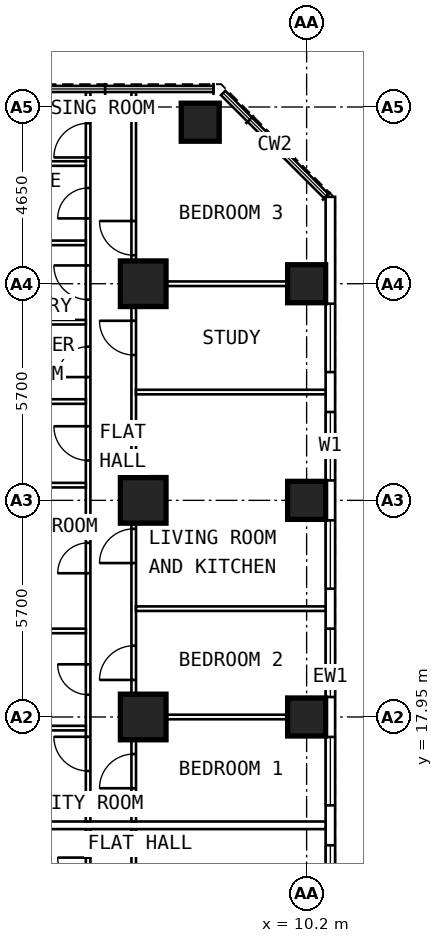
"""IFC4 building model, lengths in metres.
Left out: names, types, materials, properties, quantities, classifications, styles, units other than length and angle.
Written with IfcOpenShell. Run it as: python <this file> out.ifc"""

import sys

from ifc_helpers import new_model, si_unit, direction, frame, frame_2d, origin, origin_2d, place, context, subcontext, project, spatial, rectangle, extrude, element, fill, save


model = new_model("IFC4")
c1 = context("Model", 3, precision=1e-05, world=origin(), true_north=direction((0.0, 1.0)))
c2 = subcontext(c1, "Body", "Model", "MODEL_VIEW")
j1 = project(units=[si_unit("LENGTHUNIT", "METRE"), si_unit("PLANEANGLEUNIT", "RADIAN")], contexts=[c1])
p1 = place(None, origin())
s1 = spatial("IfcSite", under=j1, at=p1, CompositionType="ELEMENT")
p2 = place(p1, origin())
s2 = spatial("IfcBuilding", under=s1, at=p2, CompositionType="ELEMENT")
p3 = place(p2, frame((0.0, 0.0, 64.6)))
s3 = spatial("IfcBuildingStorey", under=s2, at=p3, CompositionType="ELEMENT", Elevation=64.6)
for number, where, z_axis, x_axis in (
    (1, (10.2, 17.95, 0.0), (0.0, 0.0, 1.0), (0.0, 1.0, 0.0)),
    (2, (10.2, 23.65, 0.0), (0.0, 0.0, 1.0), (0.0, 1.0, 0.0)),
    (3, (10.2, 29.35, 0.0), (0.0, 0.0, 1.0), (0.0, 1.0, 0.0)),
    (4, (7.4, 33.6, 0.0), (0.0, 0.0, 1.0), (0.0, 1.0, 0.0)),
):
    element("IfcColumn", number, at=place(p3, frame(where, z_axis=z_axis, x_axis=x_axis)), inside=s3, PredefinedType="COLUMN", context=c2, shape_type="SweptSolid", body=[
        extrude(rectangle(XDim=1.0, YDim=1.0, at=origin_2d()), origin(), (0.0, 0.0, 1.0), 3.6),
    ])
for number, where, z_axis, x_axis in (
    (5, (5.9, 17.95, 0.0), (0.0, 0.0, 1.0), (0.0, 1.0, 0.0)),
    (6, (5.9, 23.65, 0.0), (0.0, 0.0, 1.0), (0.0, 1.0, 0.0)),
    (7, (5.9, 29.35, 0.0), (0.0, 0.0, 1.0), (0.0, 1.0, 0.0)),
):
    element("IfcColumn", number, at=place(p3, frame(where, z_axis=z_axis, x_axis=x_axis)), inside=s3, PredefinedType="COLUMN", context=c2, shape_type="SweptSolid", body=[
        extrude(rectangle(XDim=1.2, YDim=1.2, at=origin_2d()), origin(), (0.0, 0.0, 1.0), 3.6),
    ])
p4 = place(p3, frame((10.825, 6.394, 0.0), z_axis=(0.0, 0.0, 1.0), x_axis=(0.0, 1.0, 0.0)))
e8 = element("IfcWall", 8, at=p4, inside=s3, PredefinedType="SOLIDWALL", context=c2, shape_type="SweptSolid", body=[
    extrude(rectangle(XDim=25.241, YDim=0.25, at=frame_2d((12.621, 0.0))), origin(), (0.0, 0.0, 1.0), 3.35),
])
p5 = place(p4, frame((0.681, 0.0, 0.8)))
e9 = element("IfcOpeningElement", 9, at=p5, cuts=e8, PredefinedType="OPENING", context=c2, shape_type="SweptSolid", body=[
    extrude(rectangle(XDim=1.8, YDim=1.8, at=frame_2d((0.9, 0.9))), frame((0.0, 0.137, 0.0), z_axis=(0.0, -1.0, 0.0), x_axis=(1.0, 0.0, 0.0)), (0.0, 0.0, 1.0), 0.274),
])
p6 = place(p4, frame((3.531, 0.0, 0.8)))
e10 = element("IfcOpeningElement", 10, at=p6, cuts=e8, PredefinedType="OPENING", context=c2, shape_type="SweptSolid", body=[
    extrude(rectangle(XDim=1.8, YDim=1.8, at=frame_2d((0.9, 0.9))), frame((0.0, 0.137, 0.0), z_axis=(0.0, -1.0, 0.0), x_axis=(1.0, 0.0, 0.0)), (0.0, 0.0, 1.0), 0.274),
])
p7 = place(p4, frame((6.381, 0.0, 0.8)))
e11 = element("IfcOpeningElement", 11, at=p7, cuts=e8, PredefinedType="OPENING", context=c2, shape_type="SweptSolid", body=[
    extrude(rectangle(XDim=1.8, YDim=1.8, at=frame_2d((0.9, 0.9))), frame((0.0, 0.137, 0.0), z_axis=(0.0, -1.0, 0.0), x_axis=(1.0, 0.0, 0.0)), (0.0, 0.0, 1.0), 0.274),
])
p8 = place(p4, frame((9.231, 0.0, 0.8)))
e12 = element("IfcOpeningElement", 12, at=p8, cuts=e8, PredefinedType="OPENING", context=c2, shape_type="SweptSolid", body=[
    extrude(rectangle(XDim=1.8, YDim=1.8, at=frame_2d((0.9, 0.9))), frame((0.0, 0.137, 0.0), z_axis=(0.0, -1.0, 0.0), x_axis=(1.0, 0.0, 0.0)), (0.0, 0.0, 1.0), 0.274),
])
p9 = place(p4, frame((12.081, 0.0, 0.8)))
e13 = element("IfcOpeningElement", 13, at=p9, cuts=e8, PredefinedType="OPENING", context=c2, shape_type="SweptSolid", body=[
    extrude(rectangle(XDim=1.8, YDim=1.8, at=frame_2d((0.9, 0.9))), frame((0.0, 0.137, 0.0), z_axis=(0.0, -1.0, 0.0), x_axis=(1.0, 0.0, 0.0)), (0.0, 0.0, 1.0), 0.274),
])
p10 = place(p4, frame((14.931, 0.0, 0.8)))
e14 = element("IfcOpeningElement", 14, at=p10, cuts=e8, PredefinedType="OPENING", context=c2, shape_type="SweptSolid", body=[
    extrude(rectangle(XDim=1.8, YDim=1.8, at=frame_2d((0.9, 0.9))), frame((0.0, 0.137, 0.0), z_axis=(0.0, -1.0, 0.0), x_axis=(1.0, 0.0, 0.0)), (0.0, 0.0, 1.0), 0.274),
])
p11 = place(p4, frame((17.781, 0.0, 0.8)))
e15 = element("IfcOpeningElement", 15, at=p11, cuts=e8, PredefinedType="OPENING", context=c2, shape_type="SweptSolid", body=[
    extrude(rectangle(XDim=1.8, YDim=1.8, at=frame_2d((0.9, 0.9))), frame((0.0, 0.137, 0.0), z_axis=(0.0, -1.0, 0.0), x_axis=(1.0, 0.0, 0.0)), (0.0, 0.0, 1.0), 0.274),
])
p12 = place(p4, frame((20.631, 0.0, 0.8)))
e16 = element("IfcOpeningElement", 16, at=p12, cuts=e8, PredefinedType="OPENING", context=c2, shape_type="SweptSolid", body=[
    extrude(rectangle(XDim=1.8, YDim=1.8, at=frame_2d((0.9, 0.9))), frame((0.0, 0.137, 0.0), z_axis=(0.0, -1.0, 0.0), x_axis=(1.0, 0.0, 0.0)), (0.0, 0.0, 1.0), 0.274),
])
p13 = place(p3, frame((4.45, 10.1, 0.0), z_axis=(0.0, 0.0, 1.0), x_axis=(0.0, 1.0, 0.0)))
e17 = element("IfcWall", 17, at=p13, inside=s3, PredefinedType="PARTITIONING", context=c2, shape_type="SweptSolid", body=[
    extrude(rectangle(XDim=4.9, YDim=0.12, at=frame_2d((2.45, 0.0))), origin(), (0.0, 0.0, 1.0), 3.35),
])
p14 = place(p13, frame((0.75, 0.0, 0.0)))
e18 = element("IfcOpeningElement", 18, at=p14, cuts=e17, PredefinedType="OPENING", context=c2, shape_type="SweptSolid", body=[
    extrude(rectangle(XDim=0.9, YDim=2.1, at=frame_2d((0.45, 1.05))), frame((0.0, 0.072, 0.0), z_axis=(0.0, -1.0, 0.0), x_axis=(1.0, 0.0, 0.0)), (0.0, 0.0, 1.0), 0.144),
])
p15 = place(p13, frame((3.35, 0.0, 0.0)))
e19 = element("IfcOpeningElement", 19, at=p15, cuts=e17, PredefinedType="OPENING", context=c2, shape_type="SweptSolid", body=[
    extrude(rectangle(XDim=0.8, YDim=2.1, at=frame_2d((0.4, 1.05))), frame((0.0, 0.072, 0.0), z_axis=(0.0, -1.0, 0.0), x_axis=(1.0, 0.0, 0.0)), (0.0, 0.0, 1.0), 0.144),
])
p16 = place(p3, frame((5.65, 9.6, 0.0), z_axis=(0.0, 0.0, 1.0), x_axis=(0.0, 1.0, 0.0)))
e20 = element("IfcWall", 20, at=p16, inside=s3, PredefinedType="PARTITIONING", context=c2, shape_type="SweptSolid", body=[
    extrude(rectangle(XDim=5.4, YDim=0.12, at=frame_2d((2.7, 0.0))), origin(), (0.0, 0.0, 1.0), 3.35),
])
p17 = place(p16, frame((3.4, 0.0, 0.0)))
e21 = element("IfcOpeningElement", 21, at=p17, cuts=e20, PredefinedType="OPENING", context=c2, shape_type="SweptSolid", body=[
    extrude(rectangle(XDim=0.9, YDim=2.1, at=frame_2d((0.45, 1.05))), frame((0.0, 0.072, 0.0), z_axis=(0.0, -1.0, 0.0), x_axis=(1.0, 0.0, 0.0)), (0.0, 0.0, 1.0), 0.144),
])
p18 = place(p3, frame((4.45, 15.2, 0.0), z_axis=(0.0, 0.0, 1.0), x_axis=(0.0, 1.0, 0.0)))
e22 = element("IfcWall", 22, at=p18, inside=s3, PredefinedType="PARTITIONING", context=c2, shape_type="SweptSolid", body=[
    extrude(rectangle(XDim=19.195, YDim=0.12, at=frame_2d((9.598, 0.0))), origin(), (0.0, 0.0, 1.0), 3.35),
])
p19 = place(p18, frame((1.329, 0.0, 0.0)))
e23 = element("IfcOpeningElement", 23, at=p19, cuts=e22, PredefinedType="OPENING", context=c2, shape_type="SweptSolid", body=[
    extrude(rectangle(XDim=0.9, YDim=2.1, at=frame_2d((0.45, 1.05))), frame((0.0, 0.072, 0.0), z_axis=(0.0, -1.0, 0.0), x_axis=(1.0, 0.0, 0.0)), (0.0, 0.0, 1.0), 0.144),
])
p20 = place(p18, frame((3.336, 0.0, 0.0)))
e24 = element("IfcOpeningElement", 24, at=p20, cuts=e22, PredefinedType="OPENING", context=c2, shape_type="SweptSolid", body=[
    extrude(rectangle(XDim=0.8, YDim=2.1, at=frame_2d((0.4, 1.05))), frame((0.0, 0.072, 0.0), z_axis=(0.0, -1.0, 0.0), x_axis=(1.0, 0.0, 0.0)), (0.0, 0.0, 1.0), 0.144),
])
p21 = place(p18, frame((6.532, 0.0, 0.0)))
e25 = element("IfcOpeningElement", 25, at=p21, cuts=e22, PredefinedType="OPENING", context=c2, shape_type="SweptSolid", body=[
    extrude(rectangle(XDim=0.8, YDim=2.1, at=frame_2d((0.4, 1.05))), frame((0.0, 0.072, 0.0), z_axis=(0.0, -1.0, 0.0), x_axis=(1.0, 0.0, 0.0)), (0.0, 0.0, 1.0), 0.144),
])
p22 = place(p18, frame((9.5, 0.0, 0.0)))
e26 = element("IfcOpeningElement", 26, at=p22, cuts=e22, PredefinedType="OPENING", context=c2, shape_type="SweptSolid", body=[
    extrude(rectangle(XDim=0.9, YDim=2.1, at=frame_2d((0.45, 1.05))), frame((0.0, 0.072, 0.0), z_axis=(0.0, -1.0, 0.0), x_axis=(1.0, 0.0, 0.0)), (0.0, 0.0, 1.0), 0.144),
])
p23 = place(p18, frame((11.694, 0.0, 0.0)))
e27 = element("IfcOpeningElement", 27, at=p23, cuts=e22, PredefinedType="OPENING", context=c2, shape_type="SweptSolid", body=[
    extrude(rectangle(XDim=0.8, YDim=2.1, at=frame_2d((0.4, 1.05))), frame((0.0, 0.072, 0.0), z_axis=(0.0, -1.0, 0.0), x_axis=(1.0, 0.0, 0.0)), (0.0, 0.0, 1.0), 0.144),
])
p24 = place(p18, frame((13.731, 0.0, 0.0)))
e28 = element("IfcOpeningElement", 28, at=p24, cuts=e22, PredefinedType="OPENING", context=c2, shape_type="SweptSolid", body=[
    extrude(rectangle(XDim=0.9, YDim=2.1, at=frame_2d((0.45, 1.05))), frame((0.0, 0.072, 0.0), z_axis=(0.0, -1.0, 0.0), x_axis=(1.0, 0.0, 0.0)), (0.0, 0.0, 1.0), 0.144),
])
p25 = place(p18, frame((15.869, 0.0, 0.0)))
e29 = element("IfcOpeningElement", 29, at=p25, cuts=e22, PredefinedType="OPENING", context=c2, shape_type="SweptSolid", body=[
    extrude(rectangle(XDim=0.8, YDim=2.1, at=frame_2d((0.4, 1.05))), frame((0.0, 0.072, 0.0), z_axis=(0.0, -1.0, 0.0), x_axis=(1.0, 0.0, 0.0)), (0.0, 0.0, 1.0), 0.144),
])
p26 = place(p18, frame((17.472, 0.0, 0.0)))
e30 = element("IfcOpeningElement", 30, at=p26, cuts=e22, PredefinedType="OPENING", context=c2, shape_type="SweptSolid", body=[
    extrude(rectangle(XDim=0.9, YDim=2.1, at=frame_2d((0.45, 1.05))), frame((0.0, 0.072, 0.0), z_axis=(0.0, -1.0, 0.0), x_axis=(1.0, 0.0, 0.0)), (0.0, 0.0, 1.0), 0.144),
])
p27 = place(p3, frame((5.65, 15.2, 0.0), z_axis=(0.0, 0.0, 1.0), x_axis=(0.0, 1.0, 0.0)))
e31 = element("IfcWall", 31, at=p27, inside=s3, PredefinedType="PARTITIONING", context=c2, shape_type="SweptSolid", body=[
    extrude(rectangle(XDim=19.195, YDim=0.12, at=frame_2d((9.598, 0.0))), origin(), (0.0, 0.0, 1.0), 3.35),
])
p28 = place(p27, frame((0.875, 0.0, 0.0)))
e32 = element("IfcOpeningElement", 32, at=p28, cuts=e31, PredefinedType="OPENING", context=c2, shape_type="SweptSolid", body=[
    extrude(rectangle(XDim=0.9, YDim=2.1, at=frame_2d((0.45, 1.05))), frame((0.0, 0.072, 0.0), z_axis=(0.0, -1.0, 0.0), x_axis=(1.0, 0.0, 0.0)), (0.0, 0.0, 1.0), 0.144),
])
p29 = place(p27, frame((3.725, 0.0, 0.0)))
e33 = element("IfcOpeningElement", 33, at=p29, cuts=e31, PredefinedType="OPENING", context=c2, shape_type="SweptSolid", body=[
    extrude(rectangle(XDim=0.9, YDim=2.1, at=frame_2d((0.45, 1.05))), frame((0.0, 0.072, 0.0), z_axis=(0.0, -1.0, 0.0), x_axis=(1.0, 0.0, 0.0)), (0.0, 0.0, 1.0), 0.144),
])
p30 = place(p27, frame((6.8, 0.0, 0.0)))
e34 = element("IfcOpeningElement", 34, at=p30, cuts=e31, PredefinedType="OPENING", context=c2, shape_type="SweptSolid", body=[
    extrude(rectangle(XDim=0.9, YDim=2.1, at=frame_2d((0.45, 1.05))), frame((0.0, 0.072, 0.0), z_axis=(0.0, -1.0, 0.0), x_axis=(1.0, 0.0, 0.0)), (0.0, 0.0, 1.0), 0.144),
])
p31 = place(p27, frame((12.275, 0.0, 0.0)))
e35 = element("IfcOpeningElement", 35, at=p31, cuts=e31, PredefinedType="OPENING", context=c2, shape_type="SweptSolid", body=[
    extrude(rectangle(XDim=0.9, YDim=2.1, at=frame_2d((0.45, 1.05))), frame((0.0, 0.072, 0.0), z_axis=(0.0, -1.0, 0.0), x_axis=(1.0, 0.0, 0.0)), (0.0, 0.0, 1.0), 0.144),
])
p32 = place(p27, frame((14.9, 0.0, 0.0)))
e36 = element("IfcOpeningElement", 36, at=p32, cuts=e31, PredefinedType="OPENING", context=c2, shape_type="SweptSolid", body=[
    extrude(rectangle(XDim=0.9, YDim=2.1, at=frame_2d((0.45, 1.05))), frame((0.0, 0.072, 0.0), z_axis=(0.0, -1.0, 0.0), x_axis=(1.0, 0.0, 0.0)), (0.0, 0.0, 1.0), 0.144),
])
p33 = place(p3, frame((5.71, 17.95, 0.0), z_axis=(0.0, 0.0, 1.0), x_axis=(1.0, 0.0, 0.0)))
e37 = element("IfcWall", 37, at=p33, inside=s3, PredefinedType="PARTITIONING", context=c2, shape_type="SweptSolid", body=[
    extrude(rectangle(XDim=4.99, YDim=0.12, at=frame_2d((2.495, 0.0))), origin(), (0.0, 0.0, 1.0), 2.45),
])
for number, where, z_axis, x_axis in (
    (38, (5.71, 20.8, 0.0), (0.0, 0.0, 1.0), (1.0, 0.0, 0.0)),
    (39, (5.71, 26.5, 0.0), (0.0, 0.0, 1.0), (1.0, 0.0, 0.0)),
):
    element("IfcWall", number, at=place(p3, frame(where, z_axis=z_axis, x_axis=x_axis)), inside=s3, PredefinedType="PARTITIONING", context=c2, shape_type="SweptSolid", body=[
        extrude(rectangle(XDim=4.99, YDim=0.12, at=frame_2d((2.495, 0.0))), origin(), (0.0, 0.0, 1.0), 3.35),
    ])
p34 = place(p3, frame((5.71, 29.35, 0.0), z_axis=(0.0, 0.0, 1.0), x_axis=(1.0, 0.0, 0.0)))
e40 = element("IfcWall", 40, at=p34, inside=s3, PredefinedType="PARTITIONING", context=c2, shape_type="SweptSolid", body=[
    extrude(rectangle(XDim=4.99, YDim=0.12, at=frame_2d((2.495, 0.0))), origin(), (0.0, 0.0, 1.0), 2.45),
])
p35 = place(p3, frame((2.1, 17.657, 0.0), z_axis=(0.0, 0.0, 1.0), x_axis=(1.0, 0.0, 0.0)))
e41 = element("IfcWall", 41, at=p35, inside=s3, PredefinedType="PARTITIONING", context=c2, shape_type="SweptSolid", body=[
    extrude(rectangle(XDim=2.29, YDim=0.12, at=frame_2d((1.145, 0.0))), origin(), (0.0, 0.0, 1.0), 2.45),
])
for number, where, z_axis, x_axis in (
    (42, (2.1, 20.214, 0.0), (0.0, 0.0, 1.0), (1.0, 0.0, 0.0)),
    (43, (2.1, 24.05, 0.0), (0.0, 0.0, 1.0), (1.0, 0.0, 0.0)),
    (44, (2.1, 26.25, 0.0), (0.0, 0.0, 1.0), (1.0, 0.0, 0.0)),
    (45, (2.1, 28.337, 0.0), (0.0, 0.0, 1.0), (1.0, 0.0, 0.0)),
    (46, (2.1, 30.425, 0.0), (0.0, 0.0, 1.0), (1.0, 0.0, 0.0)),
    (47, (2.1, 32.512, 0.0), (0.0, 0.0, 1.0), (1.0, 0.0, 0.0)),
):
    element("IfcWall", number, at=place(p3, frame(where, z_axis=z_axis, x_axis=x_axis)), inside=s3, PredefinedType="PARTITIONING", context=c2, shape_type="SweptSolid", body=[
        extrude(rectangle(XDim=2.29, YDim=0.12, at=frame_2d((1.145, 0.0))), origin(), (0.0, 0.0, 1.0), 3.35),
    ])
p36 = place(p3, frame((2.1, 15.1, 0.0), z_axis=(0.0, 0.0, 1.0), x_axis=(1.0, 0.0, 0.0)))
e48 = element("IfcWall", 48, at=p36, inside=s3, PredefinedType="PARTITIONING", context=c2, shape_type="SweptSolid", body=[
    extrude(rectangle(XDim=8.6, YDim=0.2, at=frame_2d((4.3, 0.0))), origin(), (0.0, 0.0, 1.0), 3.35),
])
p37 = place(p7, origin())
e49 = element("IfcWindow", 49, at=p37, inside=s3, PartitioningType="SINGLE_PANEL", PredefinedType="WINDOW", context=c2, shape_type="SweptSolid", body=[
    extrude(rectangle(XDim=1.8, YDim=1.8, at=frame_2d((0.9, 0.9))), frame((0.0, 0.03, 0.0), z_axis=(0.0, -1.0, 0.0), x_axis=(1.0, 0.0, 0.0)), (0.0, 0.0, 1.0), 0.06),
])
fill(e11, e49)
p38 = place(p8, origin())
e50 = element("IfcWindow", 50, at=p38, inside=s3, PartitioningType="SINGLE_PANEL", PredefinedType="WINDOW", context=c2, shape_type="SweptSolid", body=[
    extrude(rectangle(XDim=1.8, YDim=1.8, at=frame_2d((0.9, 0.9))), frame((0.0, 0.03, 0.0), z_axis=(0.0, -1.0, 0.0), x_axis=(1.0, 0.0, 0.0)), (0.0, 0.0, 1.0), 0.06),
])
fill(e12, e50)
p39 = place(p9, origin())
e51 = element("IfcWindow", 51, at=p39, inside=s3, PartitioningType="SINGLE_PANEL", PredefinedType="WINDOW", context=c2, shape_type="SweptSolid", body=[
    extrude(rectangle(XDim=1.8, YDim=1.8, at=frame_2d((0.9, 0.9))), frame((0.0, 0.03, 0.0), z_axis=(0.0, -1.0, 0.0), x_axis=(1.0, 0.0, 0.0)), (0.0, 0.0, 1.0), 0.06),
])
fill(e13, e51)
p40 = place(p10, origin())
e52 = element("IfcWindow", 52, at=p40, inside=s3, PartitioningType="SINGLE_PANEL", PredefinedType="WINDOW", context=c2, shape_type="SweptSolid", body=[
    extrude(rectangle(XDim=1.8, YDim=1.8, at=frame_2d((0.9, 0.9))), frame((0.0, 0.03, 0.0), z_axis=(0.0, -1.0, 0.0), x_axis=(1.0, 0.0, 0.0)), (0.0, 0.0, 1.0), 0.06),
])
fill(e14, e52)
p41 = place(p11, origin())
e53 = element("IfcWindow", 53, at=p41, inside=s3, PartitioningType="SINGLE_PANEL", PredefinedType="WINDOW", context=c2, shape_type="SweptSolid", body=[
    extrude(rectangle(XDim=1.8, YDim=1.8, at=frame_2d((0.9, 0.9))), frame((0.0, 0.03, 0.0), z_axis=(0.0, -1.0, 0.0), x_axis=(1.0, 0.0, 0.0)), (0.0, 0.0, 1.0), 0.06),
])
fill(e15, e53)
p42 = place(p12, origin())
e54 = element("IfcWindow", 54, at=p42, inside=s3, PartitioningType="SINGLE_PANEL", PredefinedType="WINDOW", context=c2, shape_type="SweptSolid", body=[
    extrude(rectangle(XDim=1.8, YDim=1.8, at=frame_2d((0.9, 0.9))), frame((0.0, 0.03, 0.0), z_axis=(0.0, -1.0, 0.0), x_axis=(1.0, 0.0, 0.0)), (0.0, 0.0, 1.0), 0.06),
])
fill(e16, e54)
p43 = place(p15, origin())
e55 = element("IfcDoor", 55, at=p43, inside=s3, OperationType="SINGLE_SWING_RIGHT", PredefinedType="DOOR", context=c2, shape_type="SweptSolid", body=[
    extrude(rectangle(XDim=0.8, YDim=2.1, at=frame_2d((0.4, 1.05))), frame((0.0, 0.025, 0.0), z_axis=(0.0, -1.0, 0.0), x_axis=(1.0, 0.0, 0.0)), (0.0, 0.0, 1.0), 0.05),
])
fill(e19, e55)
p44 = place(p28, origin())
e56 = element("IfcDoor", 56, at=p44, inside=s3, OperationType="SINGLE_SWING_LEFT", PredefinedType="DOOR", context=c2, shape_type="SweptSolid", body=[
    extrude(rectangle(XDim=0.9, YDim=2.1, at=frame_2d((0.45, 1.05))), frame((0.0, 0.025, 0.0), z_axis=(0.0, -1.0, 0.0), x_axis=(1.0, 0.0, 0.0)), (0.0, 0.0, 1.0), 0.05),
])
fill(e32, e56)
p45 = place(p29, origin())
e57 = element("IfcDoor", 57, at=p45, inside=s3, OperationType="SINGLE_SWING_LEFT", PredefinedType="DOOR", context=c2, shape_type="SweptSolid", body=[
    extrude(rectangle(XDim=0.9, YDim=2.1, at=frame_2d((0.45, 1.05))), frame((0.0, 0.025, 0.0), z_axis=(0.0, -1.0, 0.0), x_axis=(1.0, 0.0, 0.0)), (0.0, 0.0, 1.0), 0.05),
])
fill(e33, e57)
p46 = place(p30, origin())
e58 = element("IfcDoor", 58, at=p46, inside=s3, OperationType="SINGLE_SWING_LEFT", PredefinedType="DOOR", context=c2, shape_type="SweptSolid", body=[
    extrude(rectangle(XDim=0.9, YDim=2.1, at=frame_2d((0.45, 1.05))), frame((0.0, 0.025, 0.0), z_axis=(0.0, -1.0, 0.0), x_axis=(1.0, 0.0, 0.0)), (0.0, 0.0, 1.0), 0.05),
])
fill(e34, e58)
p47 = place(p31, origin())
e59 = element("IfcDoor", 59, at=p47, inside=s3, OperationType="SINGLE_SWING_RIGHT", PredefinedType="DOOR", context=c2, shape_type="SweptSolid", body=[
    extrude(rectangle(XDim=0.9, YDim=2.1, at=frame_2d((0.45, 1.05))), frame((0.0, 0.025, 0.0), z_axis=(0.0, -1.0, 0.0), x_axis=(1.0, 0.0, 0.0)), (0.0, 0.0, 1.0), 0.05),
])
fill(e35, e59)
p48 = place(p32, origin())
e60 = element("IfcDoor", 60, at=p48, inside=s3, OperationType="SINGLE_SWING_RIGHT", PredefinedType="DOOR", context=c2, shape_type="SweptSolid", body=[
    extrude(rectangle(XDim=0.9, YDim=2.1, at=frame_2d((0.45, 1.05))), frame((0.0, 0.025, 0.0), z_axis=(0.0, -1.0, 0.0), x_axis=(1.0, 0.0, 0.0)), (0.0, 0.0, 1.0), 0.05),
])
fill(e36, e60)
p49 = place(p19, origin())
e61 = element("IfcDoor", 61, at=p49, inside=s3, OperationType="SINGLE_SWING_RIGHT", PredefinedType="DOOR", context=c2, shape_type="SweptSolid", body=[
    extrude(rectangle(XDim=0.9, YDim=2.1, at=frame_2d((0.45, 1.05))), frame((0.0, 0.025, 0.0), z_axis=(0.0, -1.0, 0.0), x_axis=(1.0, 0.0, 0.0)), (0.0, 0.0, 1.0), 0.05),
])
fill(e23, e61)
p50 = place(p20, origin())
e62 = element("IfcDoor", 62, at=p50, inside=s3, OperationType="SINGLE_SWING_RIGHT", PredefinedType="DOOR", context=c2, shape_type="SweptSolid", body=[
    extrude(rectangle(XDim=0.8, YDim=2.1, at=frame_2d((0.4, 1.05))), frame((0.0, 0.025, 0.0), z_axis=(0.0, -1.0, 0.0), x_axis=(1.0, 0.0, 0.0)), (0.0, 0.0, 1.0), 0.05),
])
fill(e24, e62)
p51 = place(p21, origin())
e63 = element("IfcDoor", 63, at=p51, inside=s3, OperationType="SINGLE_SWING_LEFT", PredefinedType="DOOR", context=c2, shape_type="SweptSolid", body=[
    extrude(rectangle(XDim=0.8, YDim=2.1, at=frame_2d((0.4, 1.05))), frame((0.0, 0.025, 0.0), z_axis=(0.0, -1.0, 0.0), x_axis=(1.0, 0.0, 0.0)), (0.0, 0.0, 1.0), 0.05),
])
fill(e25, e63)
p52 = place(p22, origin())
e64 = element("IfcDoor", 64, at=p52, inside=s3, OperationType="SINGLE_SWING_RIGHT", PredefinedType="DOOR", context=c2, shape_type="SweptSolid", body=[
    extrude(rectangle(XDim=0.9, YDim=2.1, at=frame_2d((0.45, 1.05))), frame((0.0, 0.025, 0.0), z_axis=(0.0, -1.0, 0.0), x_axis=(1.0, 0.0, 0.0)), (0.0, 0.0, 1.0), 0.05),
])
fill(e26, e64)
p53 = place(p23, origin())
e65 = element("IfcDoor", 65, at=p53, inside=s3, OperationType="SINGLE_SWING_LEFT", PredefinedType="DOOR", context=c2, shape_type="SweptSolid", body=[
    extrude(rectangle(XDim=0.8, YDim=2.1, at=frame_2d((0.4, 1.05))), frame((0.0, 0.025, 0.0), z_axis=(0.0, -1.0, 0.0), x_axis=(1.0, 0.0, 0.0)), (0.0, 0.0, 1.0), 0.05),
])
fill(e27, e65)
p54 = place(p24, origin())
e66 = element("IfcDoor", 66, at=p54, inside=s3, OperationType="SINGLE_SWING_RIGHT", PredefinedType="DOOR", context=c2, shape_type="SweptSolid", body=[
    extrude(rectangle(XDim=0.9, YDim=2.1, at=frame_2d((0.45, 1.05))), frame((0.0, 0.025, 0.0), z_axis=(0.0, -1.0, 0.0), x_axis=(1.0, 0.0, 0.0)), (0.0, 0.0, 1.0), 0.05),
])
fill(e28, e66)
p55 = place(p25, origin())
e67 = element("IfcDoor", 67, at=p55, inside=s3, OperationType="SINGLE_SWING_LEFT", PredefinedType="DOOR", context=c2, shape_type="SweptSolid", body=[
    extrude(rectangle(XDim=0.8, YDim=2.1, at=frame_2d((0.4, 1.05))), frame((0.0, 0.025, 0.0), z_axis=(0.0, -1.0, 0.0), x_axis=(1.0, 0.0, 0.0)), (0.0, 0.0, 1.0), 0.05),
])
fill(e29, e67)
p56 = place(p26, origin())
e68 = element("IfcDoor", 68, at=p56, inside=s3, OperationType="SINGLE_SWING_LEFT", PredefinedType="DOOR", context=c2, shape_type="SweptSolid", body=[
    extrude(rectangle(XDim=0.9, YDim=2.1, at=frame_2d((0.45, 1.05))), frame((0.0, 0.025, 0.0), z_axis=(0.0, -1.0, 0.0), x_axis=(1.0, 0.0, 0.0)), (0.0, 0.0, 1.0), 0.05),
])
fill(e30, e68)
save(model, sys.argv[1])
